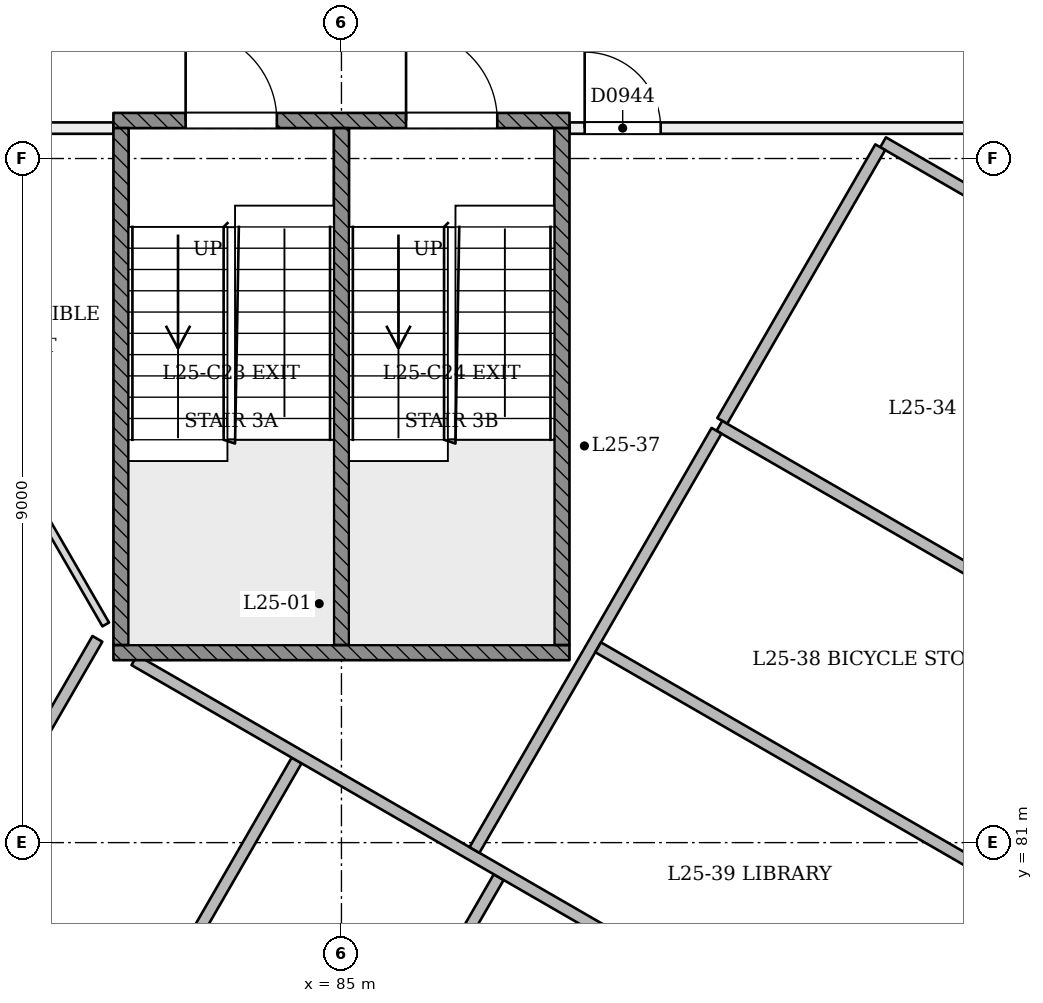
"""IFC4 building model, lengths in metres.
Left out: names, types, materials, properties, quantities, classifications, styles, units other than length and angle.
Written with IfcOpenShell. Run it as: python <this file> out.ifc"""

import sys

from ifc_helpers import new_model, si_unit, direction, frame, frame_2d, origin, place, context, subcontext, project, spatial, rectangle, extrude, element, fill, save


model = new_model("IFC4")
c1 = context("Model", 3, precision=1e-05, world=origin(), true_north=direction((0.0, 1.0)))
c2 = subcontext(c1, "Body", "Model", "MODEL_VIEW")
j1 = project(units=[si_unit("LENGTHUNIT", "METRE"), si_unit("PLANEANGLEUNIT", "RADIAN")], contexts=[c1])
p1 = place(None, origin())
s1 = spatial("IfcSite", under=j1, at=p1, CompositionType="ELEMENT")
p2 = place(p1, origin())
s2 = spatial("IfcBuilding", under=s1, at=p2, CompositionType="ELEMENT")
p3 = place(p2, frame((0.0, 0.0, 100.8)))
s3 = spatial("IfcBuildingStorey", under=s2, at=p3, CompositionType="ELEMENT", Elevation=100.8)
p4 = place(p3, frame((70.281, 90.4, 0.0), z_axis=(0.0, 0.0, 1.0), x_axis=(1.0, 0.0, 0.0)))
e1 = element("IfcWall", 1, at=p4, inside=s3, PredefinedType="PARTITIONING", context=c2, shape_type="SweptSolid", body=[
    extrude(rectangle(XDim=11.719, YDim=0.15, at=frame_2d((5.86, 0.0))), origin(), (0.0, 0.0, 1.0), 3.1),
])
p5 = place(p4, frame((9.977, 0.0, 0.0)))
e2 = element("IfcOpeningElement", 2, at=p5, cuts=e1, PredefinedType="OPENING", context=c2, shape_type="SweptSolid", body=[
    extrude(rectangle(XDim=0.9, YDim=2.1, at=frame_2d((0.45, 1.05))), frame((0.0, 0.085, 0.0), z_axis=(0.0, -1.0, 0.0), x_axis=(1.0, 0.0, 0.0)), (0.0, 0.0, 1.0), 0.171),
])
p6 = place(p4, frame((6.625, 0.0, 0.0)))
e3 = element("IfcOpeningElement", 3, at=p6, cuts=e1, PredefinedType="OPENING", context=c2, shape_type="SweptSolid", body=[
    extrude(rectangle(XDim=1.0, YDim=2.1, at=frame_2d((0.5, 1.05))), frame((0.0, 0.085, 0.0), z_axis=(0.0, -1.0, 0.0), x_axis=(1.0, 0.0, 0.0)), (0.0, 0.0, 1.0), 0.171),
])
p7 = place(p3, frame((84.935, 64.793, 0.0), z_axis=(0.0, 0.0, 1.0), x_axis=(-0.500000245635, 0.866025261967, 0.0)))
e4 = element("IfcWall", 4, at=p7, inside=s3, PredefinedType="PARTITIONING", context=c2, shape_type="SweptSolid", body=[
    extrude(rectangle(XDim=29.568, YDim=0.15, at=frame_2d((14.784, 0.0))), origin(), (0.0, 0.0, 1.0), 3.1),
])
p8 = place(p7, frame((26.417, 0.0, 0.0)))
e5 = element("IfcOpeningElement", 5, at=p8, cuts=e4, PredefinedType="OPENING", context=c2, shape_type="SweptSolid", body=[
    extrude(rectangle(XDim=0.9, YDim=2.1, at=frame_2d((0.45, 1.05))), frame((0.0, 0.085, 0.0), z_axis=(0.0, -1.0, 0.0), x_axis=(1.0, 0.0, 0.0)), (0.0, 0.0, 1.0), 0.171),
])
p9 = place(p7, frame((5.658, 0.0, 0.0)))
e6 = element("IfcOpeningElement", 6, at=p9, cuts=e4, PredefinedType="OPENING", context=c2, shape_type="SweptSolid", body=[
    extrude(rectangle(XDim=1.0, YDim=2.1, at=frame_2d((0.5, 1.05))), frame((0.0, 0.085, 0.0), z_axis=(0.0, -1.0, 0.0), x_axis=(1.0, 0.0, 0.0)), (0.0, 0.0, 1.0), 0.171),
])
p10 = place(p7, frame((9.394, 0.0, 0.0)))
e7 = element("IfcOpeningElement", 7, at=p10, cuts=e4, PredefinedType="OPENING", context=c2, shape_type="SweptSolid", body=[
    extrude(rectangle(XDim=1.0, YDim=2.1, at=frame_2d((0.5, 1.05))), frame((0.0, 0.085, 0.0), z_axis=(0.0, -1.0, 0.0), x_axis=(1.0, 0.0, 0.0)), (0.0, 0.0, 1.0), 0.171),
])
p11 = place(p7, frame((17.694, 0.0, 0.0)))
e8 = element("IfcOpeningElement", 8, at=p11, cuts=e4, PredefinedType="OPENING", context=c2, shape_type="SweptSolid", body=[
    extrude(rectangle(XDim=1.0, YDim=2.1, at=frame_2d((0.5, 1.05))), frame((0.0, 0.085, 0.0), z_axis=(0.0, -1.0, 0.0), x_axis=(1.0, 0.0, 0.0)), (0.0, 0.0, 1.0), 0.171),
])
p12 = place(p7, frame((12.884, 0.0, 0.0)))
e9 = element("IfcOpeningElement", 9, at=p12, cuts=e4, PredefinedType="OPENING", context=c2, shape_type="SweptSolid", body=[
    extrude(rectangle(XDim=1.0, YDim=2.1, at=frame_2d((0.5, 1.05))), frame((0.0, 0.085, 0.0), z_axis=(0.0, -1.0, 0.0), x_axis=(1.0, 0.0, 0.0)), (0.0, 0.0, 1.0), 0.171),
])
p13 = place(p7, frame((22.366, 0.0, 0.0)))
e10 = element("IfcOpeningElement", 10, at=p13, cuts=e4, PredefinedType="OPENING", context=c2, shape_type="SweptSolid", body=[
    extrude(rectangle(XDim=1.0, YDim=2.1, at=frame_2d((0.5, 1.05))), frame((0.0, 0.085, 0.0), z_axis=(0.0, -1.0, 0.0), x_axis=(1.0, 0.0, 0.0)), (0.0, 0.0, 1.0), 0.171),
])
p14 = place(p3, frame((88.0, 90.4, 0.0), z_axis=(0.0, 0.0, 1.0), x_axis=(1.0, 0.0, 0.0)))
e11 = element("IfcWall", 11, at=p14, inside=s3, PredefinedType="PARTITIONING", context=c2, shape_type="SweptSolid", body=[
    extrude(rectangle(XDim=11.719, YDim=0.15, at=frame_2d((5.86, 0.0))), origin(), (0.0, 0.0, 1.0), 3.1),
])
p15 = place(p14, frame((0.2, 0.0, 0.0)))
e12 = element("IfcOpeningElement", 12, at=p15, cuts=e11, PredefinedType="OPENING", context=c2, shape_type="SweptSolid", body=[
    extrude(rectangle(XDim=1.0, YDim=2.1, at=frame_2d((0.5, 1.05))), frame((0.0, 0.085, 0.0), z_axis=(0.0, -1.0, 0.0), x_axis=(1.0, 0.0, 0.0)), (0.0, 0.0, 1.0), 0.171),
])
p16 = place(p3, frame((63.623, 97.706, 0.0), z_axis=(0.0, 0.0, 1.0), x_axis=(0.500000781663, -0.866024952491, 0.0)))
e13 = element("IfcWall", 13, at=p16, inside=s3, PredefinedType="PARTITIONING", context=c2, shape_type="SweptSolid", body=[
    extrude(rectangle(XDim=41.837, YDim=0.15, at=frame_2d((20.919, 0.0))), origin(), (0.0, 0.0, 1.0), 2.7),
])
p17 = place(p16, frame((2.912, 0.0, 0.0)))
e14 = element("IfcOpeningElement", 14, at=p17, cuts=e13, PredefinedType="OPENING", context=c2, shape_type="SweptSolid", body=[
    extrude(rectangle(XDim=1.2, YDim=2.1, at=frame_2d((0.6, 1.05))), frame((0.0, 0.085, 0.0), z_axis=(0.0, -1.0, 0.0), x_axis=(1.0, 0.0, 0.0)), (0.0, 0.0, 1.0), 0.171),
])
p18 = place(p16, frame((10.198, 0.0, 0.0)))
e15 = element("IfcOpeningElement", 15, at=p18, cuts=e13, PredefinedType="OPENING", context=c2, shape_type="SweptSolid", body=[
    extrude(rectangle(XDim=1.0, YDim=2.1, at=frame_2d((0.5, 1.05))), frame((0.0, 0.085, 0.0), z_axis=(0.0, -1.0, 0.0), x_axis=(1.0, 0.0, 0.0)), (0.0, 0.0, 1.0), 0.171),
])
p19 = place(p16, frame((12.523, 0.0, 0.0)))
e16 = element("IfcOpeningElement", 16, at=p19, cuts=e13, PredefinedType="OPENING", context=c2, shape_type="SweptSolid", body=[
    extrude(rectangle(XDim=1.0, YDim=2.1, at=frame_2d((0.5, 1.05))), frame((0.0, 0.085, 0.0), z_axis=(0.0, -1.0, 0.0), x_axis=(1.0, 0.0, 0.0)), (0.0, 0.0, 1.0), 0.171),
])
p20 = place(p16, frame((19.314, 0.0, 0.0)))
e17 = element("IfcOpeningElement", 17, at=p20, cuts=e13, PredefinedType="OPENING", context=c2, shape_type="SweptSolid", body=[
    extrude(rectangle(XDim=1.0, YDim=2.1, at=frame_2d((0.5, 1.05))), frame((0.0, 0.085, 0.0), z_axis=(0.0, -1.0, 0.0), x_axis=(1.0, 0.0, 0.0)), (0.0, 0.0, 1.0), 0.171),
])
p21 = place(p16, frame((21.639, 0.0, 0.0)))
e18 = element("IfcOpeningElement", 18, at=p21, cuts=e13, PredefinedType="OPENING", context=c2, shape_type="SweptSolid", body=[
    extrude(rectangle(XDim=1.0, YDim=2.1, at=frame_2d((0.5, 1.05))), frame((0.0, 0.085, 0.0), z_axis=(0.0, -1.0, 0.0), x_axis=(1.0, 0.0, 0.0)), (0.0, 0.0, 1.0), 0.171),
])
p22 = place(p16, frame((27.169, 0.0, 0.0)))
e19 = element("IfcOpeningElement", 19, at=p22, cuts=e13, PredefinedType="OPENING", context=c2, shape_type="SweptSolid", body=[
    extrude(rectangle(XDim=1.0, YDim=2.1, at=frame_2d((0.5, 1.05))), frame((0.0, 0.085, 0.0), z_axis=(0.0, -1.0, 0.0), x_axis=(1.0, 0.0, 0.0)), (0.0, 0.0, 1.0), 0.171),
])
p23 = place(p16, frame((30.523, 0.0, 0.0)))
e20 = element("IfcOpeningElement", 20, at=p23, cuts=e13, PredefinedType="OPENING", context=c2, shape_type="SweptSolid", body=[
    extrude(rectangle(XDim=1.0, YDim=2.1, at=frame_2d((0.5, 1.05))), frame((0.0, 0.085, 0.0), z_axis=(0.0, -1.0, 0.0), x_axis=(1.0, 0.0, 0.0)), (0.0, 0.0, 1.0), 0.171),
])
p24 = place(p16, frame((37.725, 0.0, 0.0)))
e21 = element("IfcOpeningElement", 21, at=p24, cuts=e13, PredefinedType="OPENING", context=c2, shape_type="SweptSolid", body=[
    extrude(rectangle(XDim=1.2, YDim=2.1, at=frame_2d((0.6, 1.05))), frame((0.0, 0.085, 0.0), z_axis=(0.0, -1.0, 0.0), x_axis=(1.0, 0.0, 0.0)), (0.0, 0.0, 1.0), 0.171),
])
p25 = place(p3, frame((85.458, 61.474, 0.0), z_axis=(0.0, 0.0, 1.0), x_axis=(0.500000781663, 0.866024952491, 0.0)))
e22 = element("IfcWall", 22, at=p25, inside=s3, PredefinedType="PARTITIONING", context=c2, shape_type="SweptSolid", body=[
    extrude(rectangle(XDim=41.837, YDim=0.15, at=frame_2d((20.919, 0.0))), origin(), (0.0, 0.0, 1.0), 2.7),
])
p26 = place(p25, frame((0.253, 0.0, 0.0)))
e23 = element("IfcOpeningElement", 23, at=p26, cuts=e22, PredefinedType="OPENING", context=c2, shape_type="SweptSolid", body=[
    extrude(rectangle(XDim=1.2, YDim=2.1, at=frame_2d((0.6, 1.05))), frame((0.0, 0.085, 0.0), z_axis=(0.0, -1.0, 0.0), x_axis=(1.0, 0.0, 0.0)), (0.0, 0.0, 1.0), 0.171),
])
p27 = place(p25, frame((5.719, 0.0, 0.0)))
e24 = element("IfcOpeningElement", 24, at=p27, cuts=e22, PredefinedType="OPENING", context=c2, shape_type="SweptSolid", body=[
    extrude(rectangle(XDim=1.2, YDim=2.1, at=frame_2d((0.6, 1.05))), frame((0.0, 0.085, 0.0), z_axis=(0.0, -1.0, 0.0), x_axis=(1.0, 0.0, 0.0)), (0.0, 0.0, 1.0), 0.171),
])
p28 = place(p25, frame((13.669, 0.0, 0.0)))
e25 = element("IfcOpeningElement", 25, at=p28, cuts=e22, PredefinedType="OPENING", context=c2, shape_type="SweptSolid", body=[
    extrude(rectangle(XDim=1.0, YDim=2.1, at=frame_2d((0.5, 1.05))), frame((0.0, 0.085, 0.0), z_axis=(0.0, -1.0, 0.0), x_axis=(1.0, 0.0, 0.0)), (0.0, 0.0, 1.0), 0.171),
])
p29 = place(p25, frame((18.169, 0.0, 0.0)))
e26 = element("IfcOpeningElement", 26, at=p29, cuts=e22, PredefinedType="OPENING", context=c2, shape_type="SweptSolid", body=[
    extrude(rectangle(XDim=1.0, YDim=2.1, at=frame_2d((0.5, 1.05))), frame((0.0, 0.085, 0.0), z_axis=(0.0, -1.0, 0.0), x_axis=(1.0, 0.0, 0.0)), (0.0, 0.0, 1.0), 0.171),
])
p30 = place(p25, frame((21.639, 0.0, 0.0)))
e27 = element("IfcOpeningElement", 27, at=p30, cuts=e22, PredefinedType="OPENING", context=c2, shape_type="SweptSolid", body=[
    extrude(rectangle(XDim=1.0, YDim=2.1, at=frame_2d((0.5, 1.05))), frame((0.0, 0.085, 0.0), z_axis=(0.0, -1.0, 0.0), x_axis=(1.0, 0.0, 0.0)), (0.0, 0.0, 1.0), 0.171),
])
p31 = place(p25, frame((27.169, 0.0, 0.0)))
e28 = element("IfcOpeningElement", 28, at=p31, cuts=e22, PredefinedType="OPENING", context=c2, shape_type="SweptSolid", body=[
    extrude(rectangle(XDim=1.0, YDim=2.1, at=frame_2d((0.5, 1.05))), frame((0.0, 0.085, 0.0), z_axis=(0.0, -1.0, 0.0), x_axis=(1.0, 0.0, 0.0)), (0.0, 0.0, 1.0), 0.171),
])
p32 = place(p25, frame((30.639, 0.0, 0.0)))
e29 = element("IfcOpeningElement", 29, at=p32, cuts=e22, PredefinedType="OPENING", context=c2, shape_type="SweptSolid", body=[
    extrude(rectangle(XDim=1.0, YDim=2.1, at=frame_2d((0.5, 1.05))), frame((0.0, 0.085, 0.0), z_axis=(0.0, -1.0, 0.0), x_axis=(1.0, 0.0, 0.0)), (0.0, 0.0, 1.0), 0.171),
])
p33 = place(p25, frame((37.71, 0.0, 0.0)))
e30 = element("IfcOpeningElement", 30, at=p33, cuts=e22, PredefinedType="OPENING", context=c2, shape_type="SweptSolid", body=[
    extrude(rectangle(XDim=1.2, YDim=2.1, at=frame_2d((0.6, 1.05))), frame((0.0, 0.085, 0.0), z_axis=(0.0, -1.0, 0.0), x_axis=(1.0, 0.0, 0.0)), (0.0, 0.0, 1.0), 0.171),
])
p34 = place(p3, frame((99.849, 90.4, 0.0), z_axis=(0.0, 0.0, 1.0), x_axis=(-0.499999267484, -0.866025826702, 0.0)))
e31 = element("IfcWall", 31, at=p34, inside=s3, PredefinedType="PARTITIONING", context=c2, shape_type="SweptSolid", body=[
    extrude(rectangle(XDim=29.698, YDim=0.15, at=frame_2d((14.849, 0.0))), origin(), (0.0, 0.0, 1.0), 3.1),
])
p35 = place(p34, frame((2.178, 0.0, 0.0)))
e32 = element("IfcOpeningElement", 32, at=p35, cuts=e31, PredefinedType="OPENING", context=c2, shape_type="SweptSolid", body=[
    extrude(rectangle(XDim=1.0, YDim=2.1, at=frame_2d((0.5, 1.05))), frame((0.0, 0.085, 0.0), z_axis=(0.0, -1.0, 0.0), x_axis=(1.0, 0.0, 0.0)), (0.0, 0.0, 1.0), 0.171),
])
p36 = place(p34, frame((5.577, 0.0, 0.0)))
e33 = element("IfcOpeningElement", 33, at=p36, cuts=e31, PredefinedType="OPENING", context=c2, shape_type="SweptSolid", body=[
    extrude(rectangle(XDim=1.2, YDim=2.1, at=frame_2d((0.6, 1.05))), frame((0.0, 0.085, 0.0), z_axis=(0.0, -1.0, 0.0), x_axis=(1.0, 0.0, 0.0)), (0.0, 0.0, 1.0), 0.171),
])
p37 = place(p34, frame((16.531, 0.0, 0.0)))
e34 = element("IfcOpeningElement", 34, at=p37, cuts=e31, PredefinedType="OPENING", context=c2, shape_type="SweptSolid", body=[
    extrude(rectangle(XDim=1.2, YDim=2.1, at=frame_2d((0.6, 1.05))), frame((0.0, 0.085, 0.0), z_axis=(0.0, -1.0, 0.0), x_axis=(1.0, 0.0, 0.0)), (0.0, 0.0, 1.0), 0.171),
])
p38 = place(p34, frame((9.491, 0.0, 0.0)))
e35 = element("IfcOpeningElement", 35, at=p38, cuts=e31, PredefinedType="OPENING", context=c2, shape_type="SweptSolid", body=[
    extrude(rectangle(XDim=1.0, YDim=2.1, at=frame_2d((0.5, 1.05))), frame((0.0, 0.085, 0.0), z_axis=(0.0, -1.0, 0.0), x_axis=(1.0, 0.0, 0.0)), (0.0, 0.0, 1.0), 0.171),
])
p39 = place(p34, frame((12.75, 0.0, 0.0)))
e36 = element("IfcOpeningElement", 36, at=p39, cuts=e31, PredefinedType="OPENING", context=c2, shape_type="SweptSolid", body=[
    extrude(rectangle(XDim=1.0, YDim=2.1, at=frame_2d((0.5, 1.05))), frame((0.0, 0.085, 0.0), z_axis=(0.0, -1.0, 0.0), x_axis=(1.0, 0.0, 0.0)), (0.0, 0.0, 1.0), 0.171),
])
p40 = place(p34, frame((20.574, 0.0, 0.0)))
e37 = element("IfcOpeningElement", 37, at=p40, cuts=e31, PredefinedType="OPENING", context=c2, shape_type="SweptSolid", body=[
    extrude(rectangle(XDim=1.0, YDim=2.1, at=frame_2d((0.5, 1.05))), frame((0.0, 0.085, 0.0), z_axis=(0.0, -1.0, 0.0), x_axis=(1.0, 0.0, 0.0)), (0.0, 0.0, 1.0), 0.171),
])
p41 = place(p34, frame((25.296, 0.0, 0.0)))
e38 = element("IfcOpeningElement", 38, at=p41, cuts=e31, PredefinedType="OPENING", context=c2, shape_type="SweptSolid", body=[
    extrude(rectangle(XDim=1.0, YDim=2.1, at=frame_2d((0.5, 1.05))), frame((0.0, 0.085, 0.0), z_axis=(0.0, -1.0, 0.0), x_axis=(1.0, 0.0, 0.0)), (0.0, 0.0, 1.0), 0.171),
])
p42 = place(p3, frame((78.187, 90.3, 0.0), z_axis=(0.0, 0.0, 1.0), x_axis=(0.499983376661, -0.866035001061, 0.0)))
e39 = element("IfcWall", 39, at=p42, inside=s3, PredefinedType="PARTITIONING", context=c2, shape_type="SweptSolid", body=[
    extrude(rectangle(XDim=7.425, YDim=0.1, at=frame_2d((3.712, 0.0))), origin(), (0.0, 0.0, 1.0), 3.1),
])
p43 = place(p3, frame((92.126, 90.214, 0.0), z_axis=(0.0, 0.0, 1.0), x_axis=(0.866024706996, -0.500001206871, 0.0)))
e40 = element("IfcWall", 40, at=p43, inside=s3, PredefinedType="PARTITIONING", context=c2, shape_type="SweptSolid", body=[
    extrude(rectangle(XDim=6.52, YDim=0.15, at=frame_2d((3.26, 0.0))), origin(), (0.0, 0.0, 1.0), 3.1),
])
p44 = place(p3, frame((83.163, 73.78, 0.0), z_axis=(0.0, 0.0, 1.0), x_axis=(0.500011000363, 0.866019052629, 0.0)))
e41 = element("IfcWall", 41, at=p44, inside=s3, PredefinedType="PARTITIONING", context=c2, shape_type="SweptSolid", body=[
    extrude(rectangle(XDim=7.812, YDim=0.15, at=frame_2d((3.906, 0.0))), origin(), (0.0, 0.0, 1.0), 3.1),
])
p45 = place(p3, frame((84.41, 82.081, 0.0), z_axis=(0.0, 0.0, 1.0), x_axis=(-0.500010229568, -0.86601949766, 0.0)))
e42 = element("IfcWall", 42, at=p45, inside=s3, PredefinedType="PARTITIONING", context=c2, shape_type="SweptSolid", body=[
    extrude(rectangle(XDim=9.326, YDim=0.15, at=frame_2d((4.663, 0.0))), origin(), (0.0, 0.0, 1.0), 3.1),
])
p46 = place(p3, frame((77.975, 77.073, 0.0), z_axis=(0.0, 0.0, 1.0), x_axis=(0.499993928037, 0.866028909405, 0.0)))
e43 = element("IfcWall", 43, at=p46, inside=s3, PredefinedType="PARTITIONING", context=c2, shape_type="SweptSolid", body=[
    extrude(rectangle(XDim=7.629, YDim=0.15, at=frame_2d((3.814, 0.0))), origin(), (0.0, 0.0, 1.0), 3.1),
])
p47 = place(p3, frame((92.089, 90.149, 0.0), z_axis=(0.0, 0.0, 1.0), x_axis=(-0.500010491815, -0.866019346247, 0.0)))
e44 = element("IfcWall", 44, at=p47, inside=s3, PredefinedType="PARTITIONING", context=c2, shape_type="SweptSolid", body=[
    extrude(rectangle(XDim=4.158, YDim=0.15, at=frame_2d((2.079, 0.0))), origin(), (0.0, 0.0, 1.0), 3.1),
])
p48 = place(p3, frame((89.972, 86.483, 0.0), z_axis=(0.0, 0.0, 1.0), x_axis=(0.866024706996, -0.500001206871, 0.0)))
e45 = element("IfcWall", 45, at=p48, inside=s3, PredefinedType="PARTITIONING", context=c2, shape_type="SweptSolid", body=[
    extrude(rectangle(XDim=6.52, YDim=0.15, at=frame_2d((3.26, 0.0))), origin(), (0.0, 0.0, 1.0), 3.1),
])
p49 = place(p3, frame((92.36, 77.578, 0.0), z_axis=(0.0, 0.0, 1.0), x_axis=(-0.866025678131, 0.499999524817, 0.0)))
e46 = element("IfcWall", 46, at=p49, inside=s3, PredefinedType="PARTITIONING", context=c2, shape_type="SweptSolid", body=[
    extrude(rectangle(XDim=11.645, YDim=0.15, at=frame_2d((5.822, 0.0))), origin(), (0.0, 0.0, 1.0), 3.1),
])
p50 = place(p3, frame((86.75, 80.903, 0.0), z_axis=(0.0, 0.0, 1.0), x_axis=(0.500002302069, 0.86602407468, 0.0)))
e47 = element("IfcWall", 47, at=p50, inside=s3, PredefinedType="PARTITIONING", context=c2, shape_type="SweptSolid", body=[
    extrude(rectangle(XDim=6.369, YDim=0.15, at=frame_2d((3.184, 0.0))), origin(), (0.0, 0.0, 1.0), 3.1),
])
p51 = place(p3, frame((88.377, 83.57, 0.0), z_axis=(0.0, 0.0, 1.0), x_axis=(0.866015264425, -0.500017561474, 0.0)))
e48 = element("IfcWall", 48, at=p51, inside=s3, PredefinedType="PARTITIONING", context=c2, shape_type="SweptSolid", body=[
    extrude(rectangle(XDim=6.445, YDim=0.15, at=frame_2d((3.223, 0.0))), origin(), (0.0, 0.0, 1.0), 3.1),
])
p52 = place(p3, frame((82.0, 90.5, 0.0), z_axis=(0.0, 0.0, 1.0), x_axis=(1.0, 0.0, 0.0)))
e49 = element("IfcWall", 49, at=p52, inside=s3, PredefinedType="SOLIDWALL", context=c2, shape_type="SweptSolid", body=[
    extrude(rectangle(XDim=6.0, YDim=0.2, at=frame_2d((3.0, 0.0))), origin(), (0.0, 0.0, 1.0), 3.1),
])
p53 = place(p52, frame((0.95, 0.0, 0.0)))
e50 = element("IfcOpeningElement", 50, at=p53, cuts=e49, PredefinedType="OPENING", context=c2, shape_type="SweptSolid", body=[
    extrude(rectangle(XDim=1.2, YDim=2.1, at=frame_2d((0.6, 1.05))), frame((0.0, 0.11, 0.0), z_axis=(0.0, -1.0, 0.0), x_axis=(1.0, 0.0, 0.0)), (0.0, 0.0, 1.0), 0.221),
])
p54 = place(p52, frame((3.85, 0.0, 0.0)))
e51 = element("IfcOpeningElement", 51, at=p54, cuts=e49, PredefinedType="OPENING", context=c2, shape_type="SweptSolid", body=[
    extrude(rectangle(XDim=1.2, YDim=2.1, at=frame_2d((0.6, 1.05))), frame((0.0, 0.11, 0.0), z_axis=(0.0, -1.0, 0.0), x_axis=(1.0, 0.0, 0.0)), (0.0, 0.0, 1.0), 0.221),
])
p55 = place(p3, frame((82.0, 83.5, 0.0), z_axis=(0.0, 0.0, 1.0), x_axis=(1.0, 0.0, 0.0)))
e52 = element("IfcWall", 52, at=p55, inside=s3, PredefinedType="SOLIDWALL", context=c2, shape_type="SweptSolid", body=[
    extrude(rectangle(XDim=6.0, YDim=0.2, at=frame_2d((3.0, 0.0))), origin(), (0.0, 0.0, 1.0), 3.1),
])
for number, where, z_axis, x_axis in (
    (53, (82.1, 83.6, 0.0), (0.0, 0.0, 1.0), (0.0, 1.0, 0.0)),
    (54, (87.9, 83.6, 0.0), (0.0, 0.0, 1.0), (0.0, 1.0, 0.0)),
    (55, (85.0, 83.6, 0.0), (0.0, 0.0, 1.0), (0.0, 1.0, 0.0)),
):
    element("IfcWall", number, at=place(p3, frame(where, z_axis=z_axis, x_axis=x_axis)), inside=s3, PredefinedType="SOLIDWALL", context=c2, shape_type="SweptSolid", body=[
        extrude(rectangle(XDim=6.8, YDim=0.2, at=frame_2d((3.4, 0.0))), origin(), (0.0, 0.0, 1.0), 3.1),
    ])
p56 = place(p15, origin())
e56 = element("IfcDoor", 56, at=p56, inside=s3, OperationType="SINGLE_SWING_LEFT", PredefinedType="NOTDEFINED", context=c2, shape_type="SweptSolid", body=[
    extrude(rectangle(XDim=1.0, YDim=2.1, at=frame_2d((0.5, 1.05))), frame((0.0, 0.025, 0.0), z_axis=(0.0, -1.0, 0.0), x_axis=(1.0, 0.0, 0.0)), (0.0, 0.0, 1.0), 0.05),
])
fill(e12, e56)
p57 = place(p53, origin())
e57 = element("IfcDoor", 57, at=p57, inside=s3, OperationType="SINGLE_SWING_LEFT", PredefinedType="NOTDEFINED", context=c2, shape_type="SweptSolid", body=[
    extrude(rectangle(XDim=1.2, YDim=2.1, at=frame_2d((0.6, 1.05))), frame((0.0, 0.025, 0.0), z_axis=(0.0, -1.0, 0.0), x_axis=(1.0, 0.0, 0.0)), (0.0, 0.0, 1.0), 0.05),
])
fill(e50, e57)
p58 = place(p54, origin())
e58 = element("IfcDoor", 58, at=p58, inside=s3, OperationType="SINGLE_SWING_LEFT", PredefinedType="NOTDEFINED", context=c2, shape_type="SweptSolid", body=[
    extrude(rectangle(XDim=1.2, YDim=2.1, at=frame_2d((0.6, 1.05))), frame((0.0, 0.025, 0.0), z_axis=(0.0, -1.0, 0.0), x_axis=(1.0, 0.0, 0.0)), (0.0, 0.0, 1.0), 0.05),
])
fill(e51, e58)
save(model, sys.argv[1])
